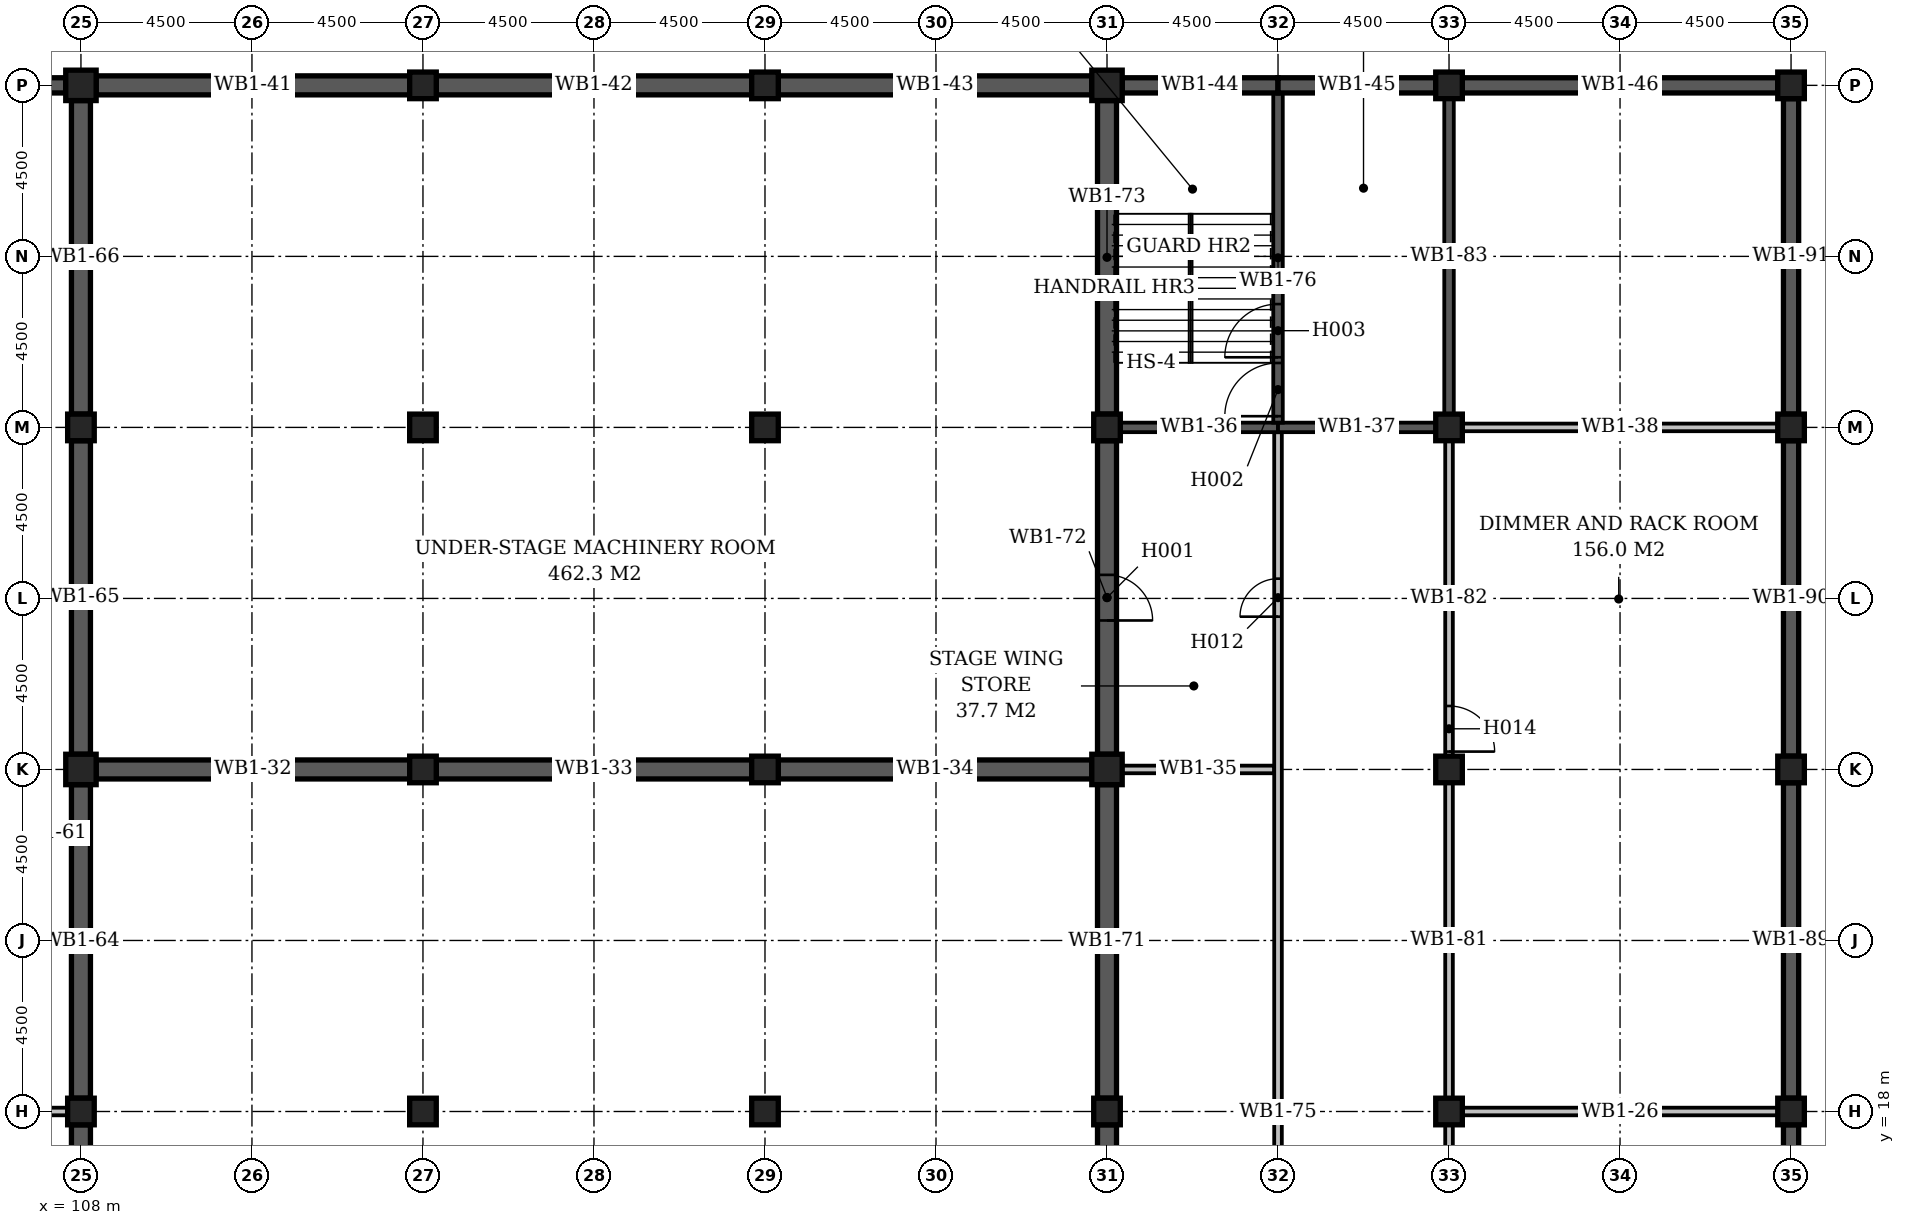
"""IFC4 building model, lengths in metres.
Left out: names, types, materials, properties, quantities, classifications, styles, units other than length and angle.
Written with IfcOpenShell. Run it as: python <this file> out.ifc"""

import sys

from ifc_helpers import new_model, si_unit, direction, frame, frame_2d, origin, origin_2d, place, context, subcontext, project, spatial, rectangle, extrude, element, fill, save


model = new_model("IFC4")
c1 = context("Model", 3, precision=1e-05, world=origin(), true_north=direction((0.0, 1.0)))
c2 = subcontext(c1, "Body", "Model", "MODEL_VIEW")
j1 = project(units=[si_unit("LENGTHUNIT", "METRE"), si_unit("PLANEANGLEUNIT", "RADIAN")], contexts=[c1])
p1 = place(None, origin())
s1 = spatial("IfcSite", under=j1, at=p1, CompositionType="ELEMENT")
p2 = place(p1, origin())
s2 = spatial("IfcBuilding", under=s1, at=p2, CompositionType="ELEMENT")
p3 = place(p2, frame((0.0, 0.0, -4.5)))
s3 = spatial("IfcBuildingStorey", under=s2, at=p3, CompositionType="ELEMENT", Elevation=-4.5)
p4 = place(p3, frame((108.0, 18.0, 0.0), z_axis=(0.0, 0.0, 1.0), x_axis=(1.0, 0.0, 0.0)))
e1 = element("IfcColumn", 1, at=p4, inside=s3, PredefinedType="COLUMN", context=c2, shape_type="SweptSolid", body=[
    extrude(rectangle(XDim=0.7, YDim=0.7, at=origin_2d()), origin(), (0.0, 0.0, 1.0), 4.2),
])
p5 = place(p3, frame((108.0, 27.0, 0.0), z_axis=(0.0, 0.0, 1.0), x_axis=(1.0, 0.0, 0.0)))
e2 = element("IfcColumn", 2, at=p5, inside=s3, PredefinedType="COLUMN", context=c2, shape_type="SweptSolid", body=[
    extrude(rectangle(XDim=0.8, YDim=0.8, at=origin_2d()), origin(), (0.0, 0.0, 1.0), 4.2),
])
p6 = place(p3, frame((108.0, 36.0, 0.0), z_axis=(0.0, 0.0, 1.0), x_axis=(1.0, 0.0, 0.0)))
e3 = element("IfcColumn", 3, at=p6, inside=s3, PredefinedType="COLUMN", context=c2, shape_type="SweptSolid", body=[
    extrude(rectangle(XDim=0.7, YDim=0.7, at=origin_2d()), origin(), (0.0, 0.0, 1.0), 4.2),
])
p7 = place(p3, frame((108.0, 45.0, 0.0), z_axis=(0.0, 0.0, 1.0), x_axis=(1.0, 0.0, 0.0)))
e4 = element("IfcColumn", 4, at=p7, inside=s3, PredefinedType="COLUMN", context=c2, shape_type="SweptSolid", body=[
    extrude(rectangle(XDim=0.8, YDim=0.8, at=origin_2d()), origin(), (0.0, 0.0, 1.0), 4.2),
])
for number, where, z_axis, x_axis in (
    (5, (117.0, 18.0, 0.0), (0.0, 0.0, 1.0), (1.0, 0.0, 0.0)),
    (6, (117.0, 27.0, 0.0), (0.0, 0.0, 1.0), (1.0, 0.0, 0.0)),
    (7, (117.0, 36.0, 0.0), (0.0, 0.0, 1.0), (1.0, 0.0, 0.0)),
    (8, (117.0, 45.0, 0.0), (0.0, 0.0, 1.0), (1.0, 0.0, 0.0)),
    (9, (126.0, 18.0, 0.0), (0.0, 0.0, 1.0), (1.0, 0.0, 0.0)),
    (10, (126.0, 27.0, 0.0), (0.0, 0.0, 1.0), (1.0, 0.0, 0.0)),
    (11, (126.0, 36.0, 0.0), (0.0, 0.0, 1.0), (1.0, 0.0, 0.0)),
    (12, (126.0, 45.0, 0.0), (0.0, 0.0, 1.0), (1.0, 0.0, 0.0)),
    (13, (135.0, 18.0, 0.0), (0.0, 0.0, 1.0), (1.0, 0.0, 0.0)),
):
    element("IfcColumn", number, at=place(p3, frame(where, z_axis=z_axis, x_axis=x_axis)), inside=s3, PredefinedType="COLUMN", context=c2, shape_type="SweptSolid", body=[
        extrude(rectangle(XDim=0.7, YDim=0.7, at=origin_2d()), origin(), (0.0, 0.0, 1.0), 4.2),
    ])
p8 = place(p3, frame((135.0, 27.0, 0.0), z_axis=(0.0, 0.0, 1.0), x_axis=(1.0, 0.0, 0.0)))
e14 = element("IfcColumn", 14, at=p8, inside=s3, PredefinedType="COLUMN", context=c2, shape_type="SweptSolid", body=[
    extrude(rectangle(XDim=0.8, YDim=0.8, at=origin_2d()), origin(), (0.0, 0.0, 1.0), 4.2),
])
p9 = place(p3, frame((135.0, 36.0, 0.0), z_axis=(0.0, 0.0, 1.0), x_axis=(1.0, 0.0, 0.0)))
e15 = element("IfcColumn", 15, at=p9, inside=s3, PredefinedType="COLUMN", context=c2, shape_type="SweptSolid", body=[
    extrude(rectangle(XDim=0.7, YDim=0.7, at=origin_2d()), origin(), (0.0, 0.0, 1.0), 4.2),
])
p10 = place(p3, frame((135.0, 45.0, 0.0), z_axis=(0.0, 0.0, 1.0), x_axis=(1.0, 0.0, 0.0)))
e16 = element("IfcColumn", 16, at=p10, inside=s3, PredefinedType="COLUMN", context=c2, shape_type="SweptSolid", body=[
    extrude(rectangle(XDim=0.8, YDim=0.8, at=origin_2d()), origin(), (0.0, 0.0, 1.0), 4.2),
])
for number, where, z_axis, x_axis in (
    (17, (144.0, 18.0, 0.0), (0.0, 0.0, 1.0), (1.0, 0.0, 0.0)),
    (18, (144.0, 27.0, 0.0), (0.0, 0.0, 1.0), (1.0, 0.0, 0.0)),
    (19, (144.0, 36.0, 0.0), (0.0, 0.0, 1.0), (1.0, 0.0, 0.0)),
    (20, (144.0, 45.0, 0.0), (0.0, 0.0, 1.0), (1.0, 0.0, 0.0)),
    (21, (153.0, 18.0, 0.0), (0.0, 0.0, 1.0), (1.0, 0.0, 0.0)),
    (22, (153.0, 27.0, 0.0), (0.0, 0.0, 1.0), (1.0, 0.0, 0.0)),
    (23, (153.0, 36.0, 0.0), (0.0, 0.0, 1.0), (1.0, 0.0, 0.0)),
    (24, (153.0, 45.0, 0.0), (0.0, 0.0, 1.0), (1.0, 0.0, 0.0)),
):
    element("IfcColumn", number, at=place(p3, frame(where, z_axis=z_axis, x_axis=x_axis)), inside=s3, PredefinedType="COLUMN", context=c2, shape_type="SweptSolid", body=[
        extrude(rectangle(XDim=0.7, YDim=0.7, at=origin_2d()), origin(), (0.0, 0.0, 1.0), 4.2),
    ])
for number, where, z_axis, x_axis in (
    (25, (99.35, 18.0, 0.0), (0.0, 0.0, 1.0), (1.0, 0.0, 0.0)),
    (26, (144.35, 18.0, 0.0), (0.0, 0.0, 1.0), (1.0, 0.0, 0.0)),
):
    element("IfcWall", number, at=place(p3, frame(where, z_axis=z_axis, x_axis=x_axis)), inside=s3, PredefinedType="STANDARD", context=c2, shape_type="SweptSolid", body=[
        extrude(rectangle(XDim=8.3, YDim=0.2, at=frame_2d((4.15, 0.0))), origin(), (0.0, 0.0, 1.0), 4.2),
    ])
p11 = place(p3, frame((108.4, 27.0, 0.0), z_axis=(0.0, 0.0, 1.0), x_axis=(1.0, 0.0, 0.0)))
e27 = element("IfcWall", 27, at=p11, inside=s3, PredefinedType="STANDARD", context=c2, shape_type="SweptSolid", body=[
    extrude(rectangle(XDim=8.25, YDim=0.5, at=frame_2d((4.125, 0.0))), origin(), (0.0, 0.0, 1.0), 4.5),
])
p12 = place(p3, frame((117.35, 27.0, 0.0), z_axis=(0.0, 0.0, 1.0), x_axis=(1.0, 0.0, 0.0)))
e28 = element("IfcWall", 28, at=p12, inside=s3, PredefinedType="STANDARD", context=c2, shape_type="SweptSolid", body=[
    extrude(rectangle(XDim=8.3, YDim=0.5, at=frame_2d((4.15, 0.0))), origin(), (0.0, 0.0, 1.0), 4.5),
])
p13 = place(p3, frame((126.35, 27.0, 0.0), z_axis=(0.0, 0.0, 1.0), x_axis=(1.0, 0.0, 0.0)))
e29 = element("IfcWall", 29, at=p13, inside=s3, PredefinedType="STANDARD", context=c2, shape_type="SweptSolid", body=[
    extrude(rectangle(XDim=8.25, YDim=0.5, at=frame_2d((4.125, 0.0))), origin(), (0.0, 0.0, 1.0), 4.5),
])
p14 = place(p3, frame((135.4, 27.0, 0.0), z_axis=(0.0, 0.0, 1.0), x_axis=(1.0, 0.0, 0.0)))
e30 = element("IfcWall", 30, at=p14, inside=s3, PredefinedType="STANDARD", context=c2, shape_type="SweptSolid", body=[
    extrude(rectangle(XDim=4.0, YDim=0.2, at=frame_2d((2.0, 0.0))), origin(), (0.0, 0.0, 1.0), 4.2),
])
p15 = place(p3, frame((135.35, 36.0, 0.0), z_axis=(0.0, 0.0, 1.0), x_axis=(1.0, 0.0, 0.0)))
e31 = element("IfcWall", 31, at=p15, inside=s3, PredefinedType="STANDARD", context=c2, shape_type="SweptSolid", body=[
    extrude(rectangle(XDim=4.15, YDim=0.25, at=frame_2d((2.075, 0.0))), origin(), (0.0, 0.0, 1.0), 4.5),
])
p16 = place(p3, frame((139.5, 36.0, 0.0), z_axis=(0.0, 0.0, 1.0), x_axis=(1.0, 0.0, 0.0)))
e32 = element("IfcWall", 32, at=p16, inside=s3, PredefinedType="STANDARD", context=c2, shape_type="SweptSolid", body=[
    extrude(rectangle(XDim=4.15, YDim=0.25, at=frame_2d((2.075, 0.0))), origin(), (0.0, 0.0, 1.0), 4.2),
])
p17 = place(p3, frame((144.35, 36.0, 0.0), z_axis=(0.0, 0.0, 1.0), x_axis=(1.0, 0.0, 0.0)))
e33 = element("IfcWall", 33, at=p17, inside=s3, PredefinedType="STANDARD", context=c2, shape_type="SweptSolid", body=[
    extrude(rectangle(XDim=8.3, YDim=0.2, at=frame_2d((4.15, 0.0))), origin(), (0.0, 0.0, 1.0), 4.2),
])
p18 = place(p3, frame((99.35, 45.0, 0.0), z_axis=(0.0, 0.0, 1.0), x_axis=(1.0, 0.0, 0.0)))
e34 = element("IfcWall", 34, at=p18, inside=s3, PredefinedType="STANDARD", context=c2, shape_type="SweptSolid", body=[
    extrude(rectangle(XDim=8.25, YDim=0.4, at=frame_2d((4.125, 0.0))), origin(), (0.0, 0.0, 1.0), 4.2),
])
p19 = place(p3, frame((108.4, 45.0, 0.0), z_axis=(0.0, 0.0, 1.0), x_axis=(1.0, 0.0, 0.0)))
e35 = element("IfcWall", 35, at=p19, inside=s3, PredefinedType="STANDARD", context=c2, shape_type="SweptSolid", body=[
    extrude(rectangle(XDim=8.25, YDim=0.5, at=frame_2d((4.125, 0.0))), origin(), (0.0, 0.0, 1.0), 4.5),
])
p20 = place(p3, frame((117.35, 45.0, 0.0), z_axis=(0.0, 0.0, 1.0), x_axis=(1.0, 0.0, 0.0)))
e36 = element("IfcWall", 36, at=p20, inside=s3, PredefinedType="STANDARD", context=c2, shape_type="SweptSolid", body=[
    extrude(rectangle(XDim=8.3, YDim=0.5, at=frame_2d((4.15, 0.0))), origin(), (0.0, 0.0, 1.0), 4.5),
])
p21 = place(p3, frame((126.35, 45.0, 0.0), z_axis=(0.0, 0.0, 1.0), x_axis=(1.0, 0.0, 0.0)))
e37 = element("IfcWall", 37, at=p21, inside=s3, PredefinedType="STANDARD", context=c2, shape_type="SweptSolid", body=[
    extrude(rectangle(XDim=8.25, YDim=0.5, at=frame_2d((4.125, 0.0))), origin(), (0.0, 0.0, 1.0), 4.5),
])
p22 = place(p3, frame((135.4, 45.0, 0.0), z_axis=(0.0, 0.0, 1.0), x_axis=(1.0, 0.0, 0.0)))
e38 = element("IfcWall", 38, at=p22, inside=s3, PredefinedType="STANDARD", context=c2, shape_type="SweptSolid", body=[
    extrude(rectangle(XDim=4.1, YDim=0.4, at=frame_2d((2.05, 0.0))), origin(), (0.0, 0.0, 1.0), 4.5),
])
p23 = place(p3, frame((139.5, 45.0, 0.0), z_axis=(0.0, 0.0, 1.0), x_axis=(1.0, 0.0, 0.0)))
e39 = element("IfcWall", 39, at=p23, inside=s3, PredefinedType="STANDARD", context=c2, shape_type="SweptSolid", body=[
    extrude(rectangle(XDim=4.15, YDim=0.4, at=frame_2d((2.075, 0.0))), origin(), (0.0, 0.0, 1.0), 4.2),
])
p24 = place(p3, frame((144.35, 45.0, 0.0), z_axis=(0.0, 0.0, 1.0), x_axis=(1.0, 0.0, 0.0)))
e40 = element("IfcWall", 40, at=p24, inside=s3, PredefinedType="STANDARD", context=c2, shape_type="SweptSolid", body=[
    extrude(rectangle(XDim=8.3, YDim=0.4, at=frame_2d((4.15, 0.0))), origin(), (0.0, 0.0, 1.0), 4.2),
])
p25 = place(p3, frame((108.0, 9.35, 0.0), z_axis=(0.0, 0.0, 1.0), x_axis=(0.0, 1.0, 0.0)))
e41 = element("IfcWall", 41, at=p25, inside=s3, PredefinedType="STANDARD", context=c2, shape_type="SweptSolid", body=[
    extrude(rectangle(XDim=8.3, YDim=0.5, at=frame_2d((4.15, 0.0))), origin(), (0.0, 0.0, 1.0), 4.5),
])
for number, where, z_axis, x_axis in (
    (42, (108.0, 18.35, 0.0), (0.0, 0.0, 1.0), (0.0, 1.0, 0.0)),
    (43, (108.0, 27.4, 0.0), (0.0, 0.0, 1.0), (0.0, 1.0, 0.0)),
    (44, (108.0, 36.35, 0.0), (0.0, 0.0, 1.0), (0.0, 1.0, 0.0)),
):
    element("IfcWall", number, at=place(p3, frame(where, z_axis=z_axis, x_axis=x_axis)), inside=s3, PredefinedType="STANDARD", context=c2, shape_type="SweptSolid", body=[
        extrude(rectangle(XDim=8.25, YDim=0.5, at=frame_2d((4.125, 0.0))), origin(), (0.0, 0.0, 1.0), 4.5),
    ])
p26 = place(p3, frame((135.0, 9.35, 0.0), z_axis=(0.0, 0.0, 1.0), x_axis=(0.0, 1.0, 0.0)))
e45 = element("IfcWall", 45, at=p26, inside=s3, PredefinedType="STANDARD", context=c2, shape_type="SweptSolid", body=[
    extrude(rectangle(XDim=8.3, YDim=0.5, at=frame_2d((4.15, 0.0))), origin(), (0.0, 0.0, 1.0), 4.5),
])
p27 = place(p3, frame((135.0, 18.35, 0.0), z_axis=(0.0, 0.0, 1.0), x_axis=(0.0, 1.0, 0.0)))
e46 = element("IfcWall", 46, at=p27, inside=s3, PredefinedType="STANDARD", context=c2, shape_type="SweptSolid", body=[
    extrude(rectangle(XDim=8.25, YDim=0.5, at=frame_2d((4.125, 0.0))), origin(), (0.0, 0.0, 1.0), 4.5),
])
p28 = place(p3, frame((135.0, 27.4, 0.0), z_axis=(0.0, 0.0, 1.0), x_axis=(0.0, 1.0, 0.0)))
e47 = element("IfcWall", 47, at=p28, inside=s3, PredefinedType="STANDARD", context=c2, shape_type="SweptSolid", body=[
    extrude(rectangle(XDim=8.25, YDim=0.5, at=frame_2d((4.125, 0.0))), origin(), (0.0, 0.0, 1.0), 4.5),
])
p29 = place(p28, frame((3.52, 0.0, 0.0)))
e48 = element("IfcOpeningElement", 48, at=p29, cuts=e47, PredefinedType="OPENING", context=c2, shape_type="SweptSolid", body=[
    extrude(rectangle(XDim=1.2, YDim=2.1, at=frame_2d((0.6, 1.05))), frame((0.0, 0.262, 0.0), z_axis=(0.0, -1.0, 0.0), x_axis=(1.0, 0.0, 0.0)), (0.0, 0.0, 1.0), 0.524),
])
p30 = place(p3, frame((135.0, 36.35, 0.0), z_axis=(0.0, 0.0, 1.0), x_axis=(0.0, 1.0, 0.0)))
e49 = element("IfcWall", 49, at=p30, inside=s3, PredefinedType="STANDARD", context=c2, shape_type="SweptSolid", body=[
    extrude(rectangle(XDim=8.25, YDim=0.5, at=frame_2d((4.125, 0.0))), origin(), (0.0, 0.0, 1.0), 4.5),
])
p31 = place(p3, frame((139.5, 0.1, 0.0), z_axis=(0.0, 0.0, 1.0), x_axis=(0.0, 1.0, 0.0)))
e50 = element("IfcWall", 50, at=p31, inside=s3, PredefinedType="STANDARD", context=c2, shape_type="SweptSolid", body=[
    extrude(rectangle(XDim=35.775, YDim=0.2, at=frame_2d((17.887, 0.0))), origin(), (0.0, 0.0, 1.0), 4.2),
])
p32 = place(p31, frame((30.92, 0.0, 0.0)))
e51 = element("IfcOpeningElement", 51, at=p32, cuts=e50, PredefinedType="OPENING", context=c2, shape_type="SweptSolid", body=[
    extrude(rectangle(XDim=1.0, YDim=2.1, at=frame_2d((0.5, 1.05))), frame((0.0, 0.112, 0.0), z_axis=(0.0, -1.0, 0.0), x_axis=(1.0, 0.0, 0.0)), (0.0, 0.0, 1.0), 0.224),
])
p33 = place(p3, frame((139.5, 36.125, 0.0), z_axis=(0.0, 0.0, 1.0), x_axis=(0.0, 1.0, 0.0)))
e52 = element("IfcWall", 52, at=p33, inside=s3, PredefinedType="STANDARD", context=c2, shape_type="SweptSolid", body=[
    extrude(rectangle(XDim=8.675, YDim=0.25, at=frame_2d((4.337, 0.0))), origin(), (0.0, 0.0, 1.0), 4.5),
])
p34 = place(p33, frame((0.17, 0.0, 0.0)))
e53 = element("IfcOpeningElement", 53, at=p34, cuts=e52, PredefinedType="OPENING", context=c2, shape_type="SweptSolid", body=[
    extrude(rectangle(XDim=1.4, YDim=2.1, at=frame_2d((0.7, 1.05))), frame((0.0, 0.137, 0.0), z_axis=(0.0, -1.0, 0.0), x_axis=(1.0, 0.0, 0.0)), (0.0, 0.0, 1.0), 0.274),
])
p35 = place(p33, frame((1.72, 0.0, 0.0)))
e54 = element("IfcOpeningElement", 54, at=p35, cuts=e52, PredefinedType="OPENING", context=c2, shape_type="SweptSolid", body=[
    extrude(rectangle(XDim=1.4, YDim=2.1, at=frame_2d((0.7, 1.05))), frame((0.0, 0.137, 0.0), z_axis=(0.0, -1.0, 0.0), x_axis=(1.0, 0.0, 0.0)), (0.0, 0.0, 1.0), 0.274),
])
p36 = place(p3, frame((144.0, 13.625, 0.0), z_axis=(0.0, 0.0, 1.0), x_axis=(0.0, 1.0, 0.0)))
e55 = element("IfcWall", 55, at=p36, inside=s3, PredefinedType="STANDARD", context=c2, shape_type="SweptSolid", body=[
    extrude(rectangle(XDim=4.025, YDim=0.2, at=frame_2d((2.012, 0.0))), origin(), (0.0, 0.0, 1.0), 4.2),
])
p37 = place(p3, frame((144.0, 18.35, 0.0), z_axis=(0.0, 0.0, 1.0), x_axis=(0.0, 1.0, 0.0)))
e56 = element("IfcWall", 56, at=p37, inside=s3, PredefinedType="STANDARD", context=c2, shape_type="SweptSolid", body=[
    extrude(rectangle(XDim=8.3, YDim=0.2, at=frame_2d((4.15, 0.0))), origin(), (0.0, 0.0, 1.0), 4.2),
])
p38 = place(p3, frame((144.0, 27.35, 0.0), z_axis=(0.0, 0.0, 1.0), x_axis=(0.0, 1.0, 0.0)))
e57 = element("IfcWall", 57, at=p38, inside=s3, PredefinedType="STANDARD", context=c2, shape_type="SweptSolid", body=[
    extrude(rectangle(XDim=8.3, YDim=0.2, at=frame_2d((4.15, 0.0))), origin(), (0.0, 0.0, 1.0), 4.2),
])
p39 = place(p38, frame((0.12, 0.0, 0.0)))
e58 = element("IfcOpeningElement", 58, at=p39, cuts=e57, PredefinedType="OPENING", context=c2, shape_type="SweptSolid", body=[
    extrude(rectangle(XDim=1.2, YDim=2.1, at=frame_2d((0.6, 1.05))), frame((0.0, 0.112, 0.0), z_axis=(0.0, -1.0, 0.0), x_axis=(1.0, 0.0, 0.0)), (0.0, 0.0, 1.0), 0.224),
])
p40 = place(p3, frame((144.0, 36.35, 0.0), z_axis=(0.0, 0.0, 1.0), x_axis=(0.0, 1.0, 0.0)))
e59 = element("IfcWall", 59, at=p40, inside=s3, PredefinedType="STANDARD", context=c2, shape_type="SweptSolid", body=[
    extrude(rectangle(XDim=8.3, YDim=0.25, at=frame_2d((4.15, 0.0))), origin(), (0.0, 0.0, 1.0), 4.2),
])
for number, where, z_axis, x_axis in (
    (60, (153.0, 9.35, 0.0), (0.0, 0.0, 1.0), (0.0, 1.0, 0.0)),
    (61, (153.0, 18.35, 0.0), (0.0, 0.0, 1.0), (0.0, 1.0, 0.0)),
    (62, (153.0, 27.35, 0.0), (0.0, 0.0, 1.0), (0.0, 1.0, 0.0)),
    (63, (153.0, 36.35, 0.0), (0.0, 0.0, 1.0), (0.0, 1.0, 0.0)),
):
    element("IfcWall", number, at=place(p3, frame(where, z_axis=z_axis, x_axis=x_axis)), inside=s3, PredefinedType="STANDARD", context=c2, shape_type="SweptSolid", body=[
        extrude(rectangle(XDim=8.3, YDim=0.4, at=frame_2d((4.15, 0.0))), origin(), (0.0, 0.0, 1.0), 4.2),
    ])
p41 = place(p29, frame((1.2, 0.0, 0.0), z_axis=(0.0, 0.0, 1.0), x_axis=(-1.0, 0.0, 0.0)))
e64 = element("IfcDoor", 64, at=p41, inside=s3, OperationType="SINGLE_SWING_RIGHT", PredefinedType="DOOR", context=c2, shape_type="SweptSolid", body=[
    extrude(rectangle(XDim=1.2, YDim=2.1, at=frame_2d((0.6, 1.05))), frame((0.0, 0.025, 0.0), z_axis=(0.0, -1.0, 0.0), x_axis=(1.0, 0.0, 0.0)), (0.0, 0.0, 1.0), 0.05),
])
fill(e48, e64)
p42 = place(p34, origin())
e65 = element("IfcDoor", 65, at=p42, inside=s3, OperationType="DOUBLE_DOOR_SINGLE_SWING", PredefinedType="DOOR", context=c2, shape_type="SweptSolid", body=[
    extrude(rectangle(XDim=1.4, YDim=2.1, at=frame_2d((0.7, 1.05))), frame((0.0, 0.025, 0.0), z_axis=(0.0, -1.0, 0.0), x_axis=(1.0, 0.0, 0.0)), (0.0, 0.0, 1.0), 0.05),
])
fill(e53, e65)
p43 = place(p35, origin())
e66 = element("IfcDoor", 66, at=p43, inside=s3, OperationType="DOUBLE_DOOR_SINGLE_SWING", PredefinedType="DOOR", context=c2, shape_type="SweptSolid", body=[
    extrude(rectangle(XDim=1.4, YDim=2.1, at=frame_2d((0.7, 1.05))), frame((0.0, 0.025, 0.0), z_axis=(0.0, -1.0, 0.0), x_axis=(1.0, 0.0, 0.0)), (0.0, 0.0, 1.0), 0.05),
])
fill(e54, e66)
p44 = place(p32, origin())
e67 = element("IfcDoor", 67, at=p44, inside=s3, OperationType="SINGLE_SWING_LEFT", PredefinedType="DOOR", context=c2, shape_type="SweptSolid", body=[
    extrude(rectangle(XDim=1.0, YDim=2.1, at=frame_2d((0.5, 1.05))), frame((0.0, 0.025, 0.0), z_axis=(0.0, -1.0, 0.0), x_axis=(1.0, 0.0, 0.0)), (0.0, 0.0, 1.0), 0.05),
])
fill(e51, e67)
p45 = place(p39, frame((1.2, 0.0, 0.0), z_axis=(0.0, 0.0, 1.0), x_axis=(-1.0, 0.0, 0.0)))
e68 = element("IfcDoor", 68, at=p45, inside=s3, OperationType="SINGLE_SWING_RIGHT", PredefinedType="DOOR", context=c2, shape_type="SweptSolid", body=[
    extrude(rectangle(XDim=1.2, YDim=2.1, at=frame_2d((0.6, 1.05))), frame((0.0, 0.025, 0.0), z_axis=(0.0, -1.0, 0.0), x_axis=(1.0, 0.0, 0.0)), (0.0, 0.0, 1.0), 0.05),
])
fill(e58, e68)
save(model, sys.argv[1])
